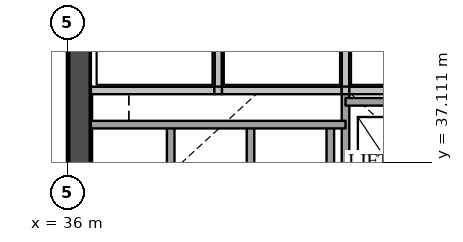
"""IFC4 building model, lengths in metres.
Left out: names, types, materials, properties, quantities, classifications, styles, units other than length and angle.
Written with IfcOpenShell. Run it as: python <this file> out.ifc"""

import sys

from ifc_helpers import new_model, si_unit, direction, frame, frame_2d, origin, place, context, subcontext, project, spatial, rectangle, extrude, element, save


model = new_model("IFC4")
c1 = context("Model", 3, precision=1e-05, world=origin(), true_north=direction((0.0, 1.0)))
c2 = subcontext(c1, "Body", "Model", "MODEL_VIEW")
j1 = project(units=[si_unit("LENGTHUNIT", "METRE"), si_unit("PLANEANGLEUNIT", "RADIAN")], contexts=[c1])
p1 = place(None, origin())
s1 = spatial("IfcSite", under=j1, at=p1, CompositionType="ELEMENT")
p2 = place(p1, origin())
s2 = spatial("IfcBuilding", under=s1, at=p2, CompositionType="ELEMENT")
p3 = place(p2, frame((0.0, 0.0, 14.0)))
s3 = spatial("IfcBuildingStorey", under=s2, at=p3, CompositionType="ELEMENT", Elevation=14.0)
p4 = place(p3, frame((36.3, 29.1, 0.0), z_axis=(0.0, 0.0, 1.0), x_axis=(0.0, 1.0, 0.0)))
e1 = element("IfcWall", 1, at=p4, inside=s3, PredefinedType="SHEAR", context=c2, shape_type="SweptSolid", body=[
    extrude(rectangle(XDim=20.3, YDim=0.6, at=frame_2d((10.15, 0.0))), origin(), (0.0, 0.0, 1.0), 6.59),
])
p5 = place(p3, frame((38.7, 34.9, 0.0), z_axis=(0.0, 0.0, 1.0), x_axis=(0.0, 1.0, 0.0)))
e2 = element("IfcWall", 2, at=p5, inside=s3, PredefinedType="SOLIDWALL", context=c2, shape_type="SweptSolid", body=[
    extrude(rectangle(XDim=3.2, YDim=0.2, at=frame_2d((1.6, 0.0))), origin(), (0.0, 0.0, 1.0), 6.59),
])
p6 = place(p3, frame((39.95, 39.0, 0.0), z_axis=(0.0, 0.0, 1.0), x_axis=(0.0, 1.0, 0.0)))
e3 = element("IfcWall", 3, at=p6, inside=s3, PredefinedType="SOLIDWALL", context=c2, shape_type="SweptSolid", body=[
    extrude(rectangle(XDim=2.06, YDim=0.2, at=frame_2d((1.03, 0.0))), origin(), (0.0, 0.0, 1.0), 6.59),
])
for number, where, z_axis, x_axis in (
    (4, (40.8, 34.9, 0.0), (0.0, 0.0, 1.0), (0.0, 1.0, 0.0)),
    (5, (42.9, 34.9, 0.0), (0.0, 0.0, 1.0), (0.0, 1.0, 0.0)),
):
    element("IfcWall", number, at=place(p3, frame(where, z_axis=z_axis, x_axis=x_axis)), inside=s3, PredefinedType="SOLIDWALL", context=c2, shape_type="SweptSolid", body=[
        extrude(rectangle(XDim=3.2, YDim=0.2, at=frame_2d((1.6, 0.0))), origin(), (0.0, 0.0, 1.0), 6.59),
    ])
p7 = place(p3, frame((43.3, 29.1, 0.0), z_axis=(0.0, 0.0, 1.0), x_axis=(0.0, 1.0, 0.0)))
e6 = element("IfcWall", 6, at=p7, inside=s3, PredefinedType="SOLIDWALL", context=c2, shape_type="SweptSolid", body=[
    extrude(rectangle(XDim=9.9, YDim=0.2, at=frame_2d((4.95, 0.0))), origin(), (0.0, 0.0, 1.0), 6.59),
])
p8 = place(p7, frame((3.6, 0.0, 0.0)))
e7 = element("IfcOpeningElement", 7, at=p8, cuts=e6, PredefinedType="OPENING", context=c2, shape_type="SweptSolid", body=[
    extrude(rectangle(XDim=1.8, YDim=2.1, at=frame_2d((0.9, 1.05))), frame((0.0, 0.11, 0.0), z_axis=(0.0, -1.0, 0.0), x_axis=(1.0, 0.0, 0.0)), (0.0, 0.0, 1.0), 0.22),
])
p9 = place(p3, frame((43.3, 39.0, 0.0), z_axis=(0.0, 0.0, 1.0), x_axis=(0.0, 1.0, 0.0)))
e8 = element("IfcWall", 8, at=p9, inside=s3, PredefinedType="SOLIDWALL", context=c2, shape_type="SweptSolid", body=[
    extrude(rectangle(XDim=2.06, YDim=0.2, at=frame_2d((1.03, 0.0))), origin(), (0.0, 0.0, 1.0), 6.59),
])
p10 = place(p3, frame((36.6, 38.1, 0.0), z_axis=(0.0, 0.0, 1.0), x_axis=(1.0, 0.0, 0.0)))
e9 = element("IfcWall", 9, at=p10, inside=s3, PredefinedType="SOLIDWALL", context=c2, shape_type="SweptSolid", body=[
    extrude(rectangle(XDim=6.7, YDim=0.2, at=frame_2d((3.35, 0.0))), origin(), (0.0, 0.0, 1.0), 6.59),
])
p11 = place(p3, frame((43.3, 38.7, 0.0), z_axis=(0.0, 0.0, 1.0), x_axis=(1.0, 0.0, 0.0)))
e10 = element("IfcWall", 10, at=p11, inside=s3, PredefinedType="SOLIDWALL", context=c2, shape_type="SweptSolid", body=[
    extrude(rectangle(XDim=4.5, YDim=0.2, at=frame_2d((2.25, 0.0))), origin(), (0.0, 0.0, 1.0), 6.59),
])
p12 = place(p3, frame((36.6, 39.0, 0.0), z_axis=(0.0, 0.0, 1.0), x_axis=(1.0, 0.0, 0.0)))
e11 = element("IfcWall", 11, at=p12, inside=s3, PredefinedType="SOLIDWALL", context=c2, shape_type="SweptSolid", body=[
    extrude(rectangle(XDim=3.25, YDim=0.2, at=frame_2d((1.625, 0.0))), origin(), (0.0, 0.0, 1.0), 6.59),
])
p13 = place(p3, frame((39.85, 39.0, 0.0), z_axis=(0.0, 0.0, 1.0), x_axis=(1.0, 0.0, 0.0)))
e12 = element("IfcWall", 12, at=p13, inside=s3, PredefinedType="SOLIDWALL", context=c2, shape_type="SweptSolid", body=[
    extrude(rectangle(XDim=0.2, YDim=0.2, at=frame_2d((0.1, 0.0))), origin(), (0.0, 0.0, 1.0), 6.59),
])
p14 = place(p3, frame((40.05, 39.0, 0.0), z_axis=(0.0, 0.0, 1.0), x_axis=(1.0, 0.0, 0.0)))
e13 = element("IfcWall", 13, at=p14, inside=s3, PredefinedType="SOLIDWALL", context=c2, shape_type="SweptSolid", body=[
    extrude(rectangle(XDim=3.15, YDim=0.2, at=frame_2d((1.575, 0.0))), origin(), (0.0, 0.0, 1.0), 6.59),
])
p15 = place(p3, frame((43.2, 39.0, 0.0), z_axis=(0.0, 0.0, 1.0), x_axis=(1.0, 0.0, 0.0)))
e14 = element("IfcWall", 14, at=p15, inside=s3, PredefinedType="SOLIDWALL", context=c2, shape_type="SweptSolid", body=[
    extrude(rectangle(XDim=0.2, YDim=0.2, at=frame_2d((0.1, 0.0))), origin(), (0.0, 0.0, 1.0), 6.59),
])
p16 = place(p3, frame((43.4, 39.0, 0.0), z_axis=(0.0, 0.0, 1.0), x_axis=(1.0, 0.0, 0.0)))
e15 = element("IfcWall", 15, at=p16, inside=s3, PredefinedType="SOLIDWALL", context=c2, shape_type="SweptSolid", body=[
    extrude(rectangle(XDim=3.25, YDim=0.2, at=frame_2d((1.625, 0.0))), origin(), (0.0, 0.0, 1.0), 6.59),
])
save(model, sys.argv[1])
